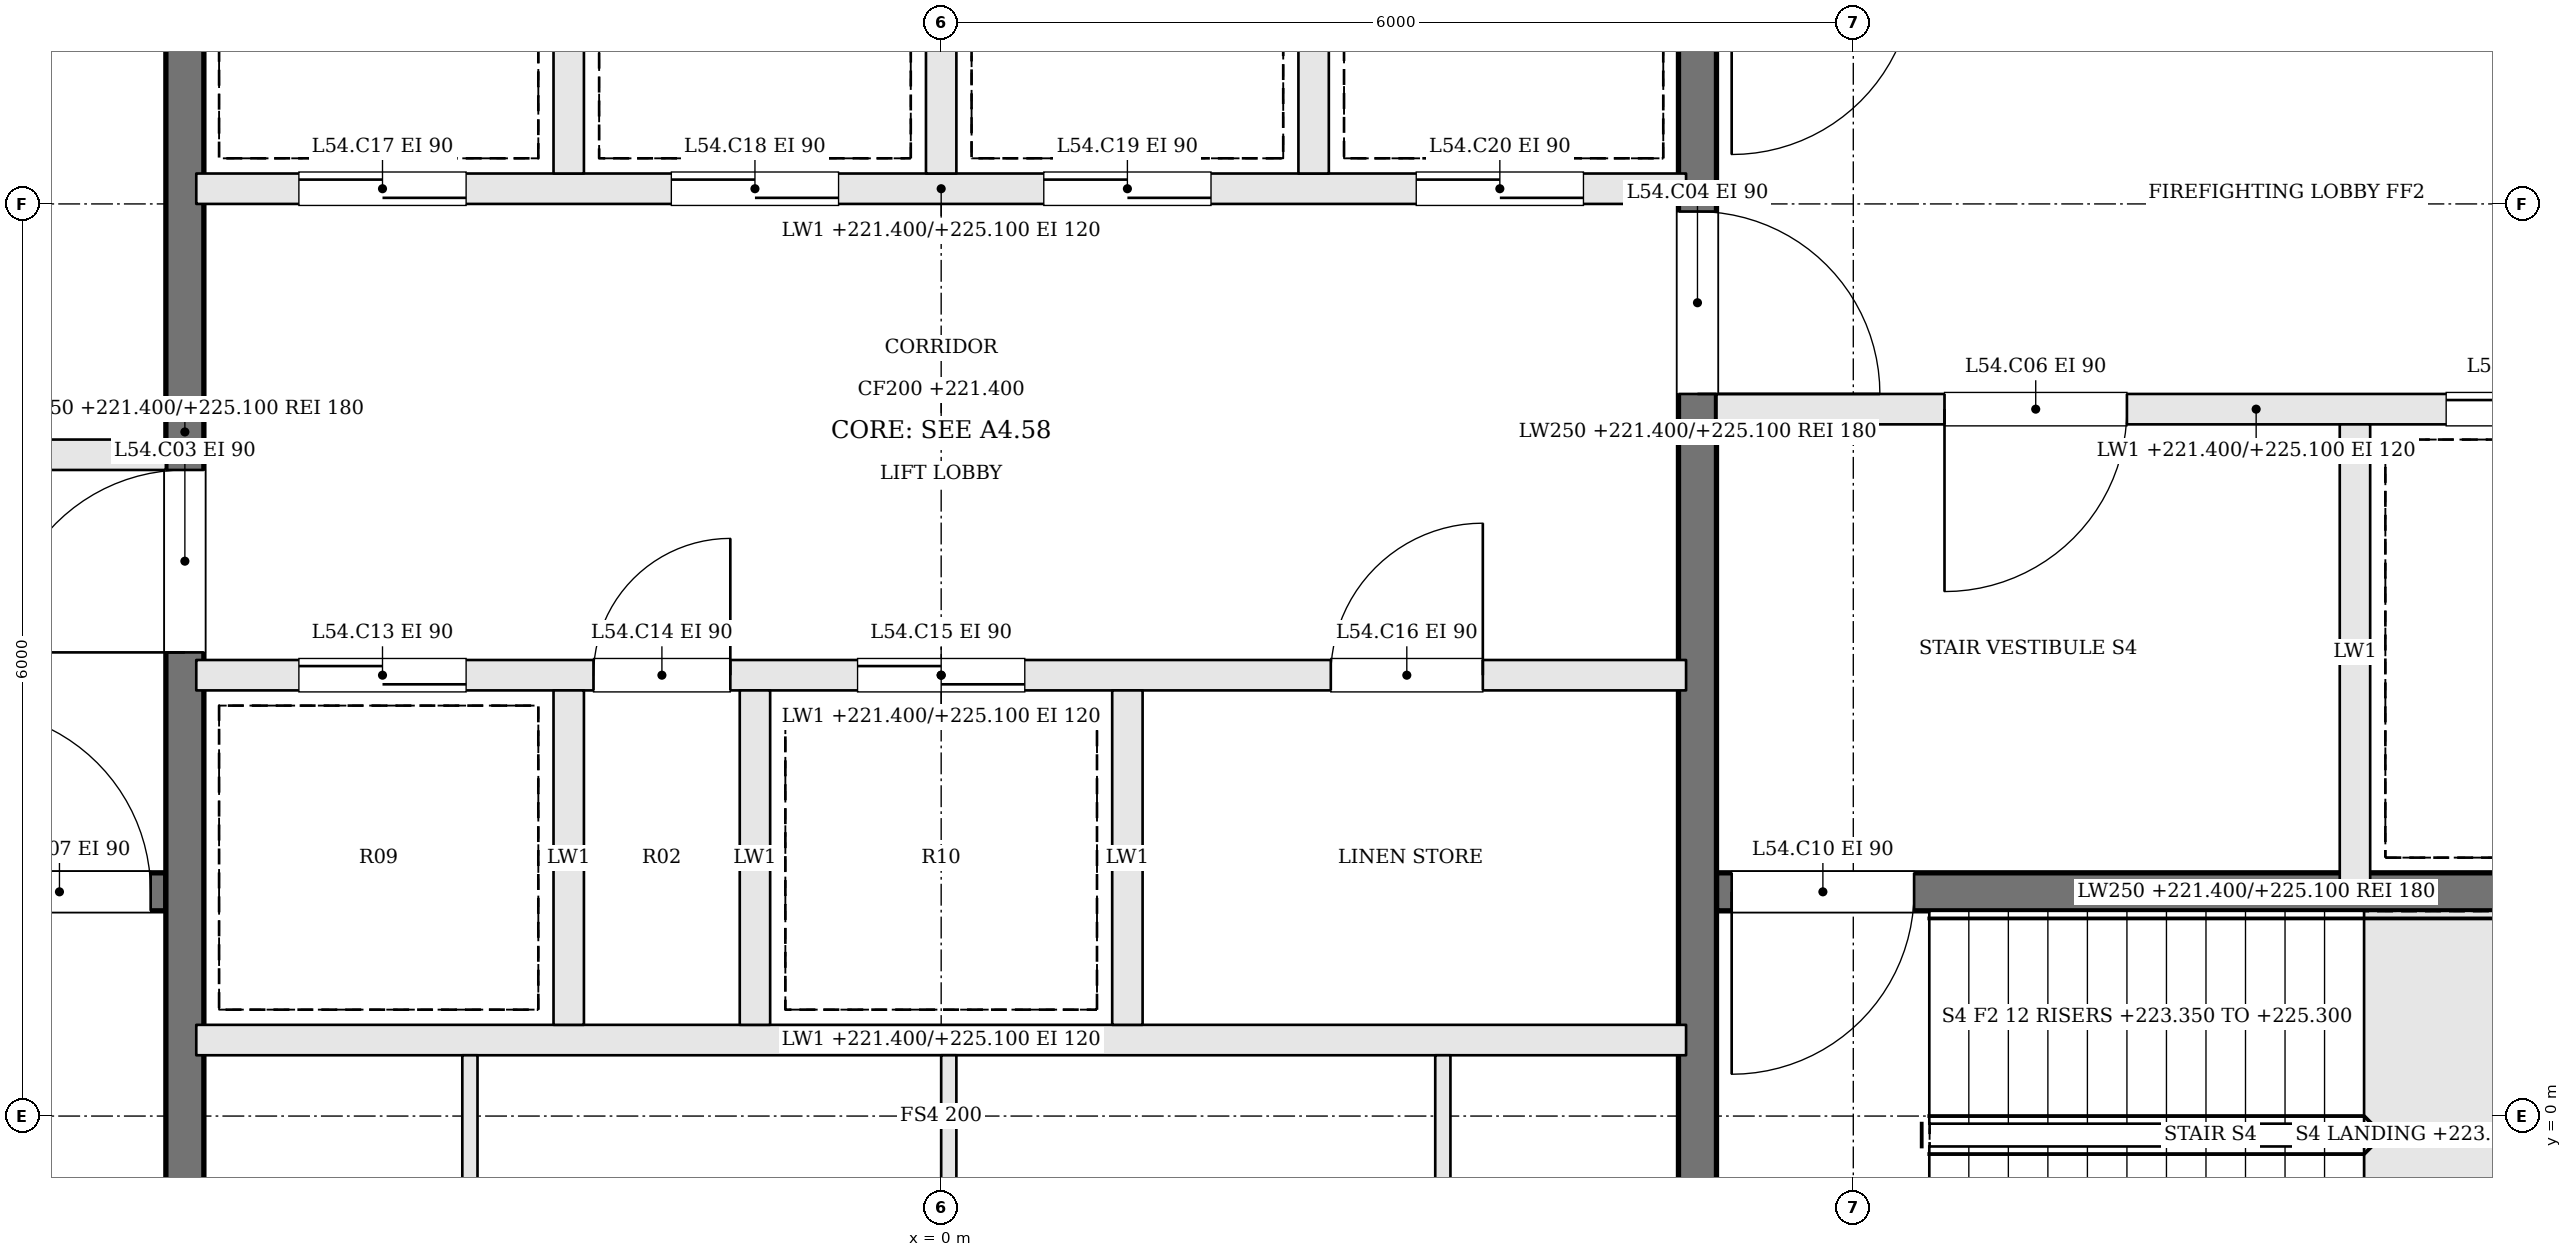
"""IFC4 building model, lengths in metres.
Left out: names, types, materials, properties, quantities, classifications, styles, units other than length and angle.
Written with IfcOpenShell. Run it as: python <this file> out.ifc"""

import sys

from ifc_helpers import new_model, si_unit, direction, frame, frame_2d, origin, place, context, subcontext, project, spatial, rectangle, extrude, element, fill, save


model = new_model("IFC4")
c1 = context("Model", 3, precision=1e-05, world=origin(), true_north=direction((0.0, 1.0)))
c2 = subcontext(c1, "Body", "Model", "MODEL_VIEW")
j1 = project(units=[si_unit("LENGTHUNIT", "METRE"), si_unit("PLANEANGLEUNIT", "RADIAN")], contexts=[c1])
p1 = place(None, origin())
s1 = spatial("IfcSite", under=j1, at=p1, CompositionType="ELEMENT")
p2 = place(p1, origin())
s2 = spatial("IfcBuilding", under=s1, at=p2, CompositionType="ELEMENT")
p3 = place(p2, frame((0.0, 0.0, 221.4)))
s3 = spatial("IfcBuildingStorey", under=s2, at=p3, CompositionType="ELEMENT", Elevation=221.4)
p4 = place(p3, frame((-12.2, 1.475, 0.0), z_axis=(0.0, 0.0, 1.0), x_axis=(1.0, 0.0, 0.0)))
e1 = element("IfcWall", 1, at=p4, inside=s3, PredefinedType="SOLIDWALL", context=c2, shape_type="SweptSolid", body=[
    extrude(rectangle(XDim=7.1, YDim=0.25, at=frame_2d((3.55, 0.0))), origin(), (0.0, 0.0, 1.0), 3.7),
])
p5 = place(p4, frame((5.8, 0.0, 0.0)))
e2 = element("IfcOpeningElement", 2, at=p5, cuts=e1, PredefinedType="OPENING", context=c2, shape_type="SweptSolid", body=[
    extrude(rectangle(XDim=1.2, YDim=2.1, at=frame_2d((0.6, 1.05))), frame((0.0, 0.135, 0.0), z_axis=(0.0, -1.0, 0.0), x_axis=(1.0, 0.0, 0.0)), (0.0, 0.0, 1.0), 0.27),
])
p6 = place(p3, frame((-12.2, 4.35, 0.0), z_axis=(0.0, 0.0, 1.0), x_axis=(1.0, 0.0, 0.0)))
e3 = element("IfcWall", 3, at=p6, inside=s3, PredefinedType="SOLIDWALL", context=c2, shape_type="SweptSolid", body=[
    extrude(rectangle(XDim=7.1, YDim=0.2, at=frame_2d((3.55, 0.0))), origin(), (0.0, 0.0, 1.0), 3.7),
])
p7 = place(p6, frame((4.4, 0.0, 0.0)))
e4 = element("IfcOpeningElement", 4, at=p7, cuts=e3, PredefinedType="OPENING", context=c2, shape_type="SweptSolid", body=[
    extrude(rectangle(XDim=1.2, YDim=2.1, at=frame_2d((0.6, 1.05))), frame((0.0, 0.11, 0.0), z_axis=(0.0, -1.0, 0.0), x_axis=(1.0, 0.0, 0.0)), (0.0, 0.0, 1.0), 0.22),
])
p8 = place(p6, frame((1.1, 0.0, 0.0)))
e5 = element("IfcOpeningElement", 5, at=p8, cuts=e3, PredefinedType="OPENING", context=c2, shape_type="SweptSolid", body=[
    extrude(rectangle(XDim=1.2, YDim=2.1, at=frame_2d((0.6, 1.05))), frame((0.0, 0.11, 0.0), z_axis=(0.0, -1.0, 0.0), x_axis=(1.0, 0.0, 0.0)), (0.0, 0.0, 1.0), 0.22),
])
p9 = place(p3, frame((12.2, 4.65, 0.0), z_axis=(0.0, 0.0, 1.0), x_axis=(-1.0, 0.0, 0.0)))
e6 = element("IfcWall", 6, at=p9, inside=s3, PredefinedType="SOLIDWALL", context=c2, shape_type="SweptSolid", body=[
    extrude(rectangle(XDim=7.1, YDim=0.2, at=frame_2d((3.55, 0.0))), origin(), (0.0, 0.0, 1.0), 3.7),
])
p10 = place(p9, frame((4.4, 0.0, 0.0)))
e7 = element("IfcOpeningElement", 7, at=p10, cuts=e6, PredefinedType="OPENING", context=c2, shape_type="SweptSolid", body=[
    extrude(rectangle(XDim=1.2, YDim=2.1, at=frame_2d((0.6, 1.05))), frame((0.0, 0.11, 0.0), z_axis=(0.0, -1.0, 0.0), x_axis=(1.0, 0.0, 0.0)), (0.0, 0.0, 1.0), 0.22),
])
p11 = place(p9, frame((1.1, 0.0, 0.0)))
e8 = element("IfcOpeningElement", 8, at=p11, cuts=e6, PredefinedType="OPENING", context=c2, shape_type="SweptSolid", body=[
    extrude(rectangle(XDim=1.2, YDim=2.1, at=frame_2d((0.6, 1.05))), frame((0.0, 0.11, 0.0), z_axis=(0.0, -1.0, 0.0), x_axis=(1.0, 0.0, 0.0)), (0.0, 0.0, 1.0), 0.22),
])
p12 = place(p3, frame((12.2, 1.475, 0.0), z_axis=(0.0, 0.0, 1.0), x_axis=(-1.0, 0.0, 0.0)))
e9 = element("IfcWall", 9, at=p12, inside=s3, PredefinedType="SOLIDWALL", context=c2, shape_type="SweptSolid", body=[
    extrude(rectangle(XDim=7.1, YDim=0.25, at=frame_2d((3.55, 0.0))), origin(), (0.0, 0.0, 1.0), 3.7),
])
p13 = place(p12, frame((5.8, 0.0, 0.0)))
e10 = element("IfcOpeningElement", 10, at=p13, cuts=e9, PredefinedType="OPENING", context=c2, shape_type="SweptSolid", body=[
    extrude(rectangle(XDim=1.2, YDim=2.1, at=frame_2d((0.6, 1.05))), frame((0.0, 0.135, 0.0), z_axis=(0.0, -1.0, 0.0), x_axis=(1.0, 0.0, 0.0)), (0.0, 0.0, 1.0), 0.27),
])
p14 = place(p3, frame((9.3, 4.55, 0.0), z_axis=(0.0, 0.0, 1.0), x_axis=(0.0, -1.0, 0.0)))
e11 = element("IfcWall", 11, at=p14, inside=s3, PredefinedType="SOLIDWALL", context=c2, shape_type="SweptSolid", body=[
    extrude(rectangle(XDim=3.0, YDim=0.2, at=frame_2d((1.5, 0.0))), origin(), (0.0, 0.0, 1.0), 3.7),
])
p15 = place(p3, frame((-4.975, -2.2, 0.0), z_axis=(0.0, 0.0, 1.0), x_axis=(0.0, 1.0, 0.0)))
e12 = element("IfcWall", 12, at=p15, inside=s3, PredefinedType="SOLIDWALL", context=c2, shape_type="SweptSolid", body=[
    extrude(rectangle(XDim=13.4, YDim=0.25, at=frame_2d((6.7, 0.0))), origin(), (0.0, 0.0, 1.0), 3.7),
])
p16 = place(p15, frame((5.25, 0.0, 0.0)))
e13 = element("IfcOpeningElement", 13, at=p16, cuts=e12, PredefinedType="OPENING", context=c2, shape_type="SweptSolid", body=[
    extrude(rectangle(XDim=1.2, YDim=2.1, at=frame_2d((0.6, 1.05))), frame((0.0, 0.135, 0.0), z_axis=(0.0, -1.0, 0.0), x_axis=(1.0, 0.0, 0.0)), (0.0, 0.0, 1.0), 0.27),
])
p17 = place(p3, frame((4.975, 11.2, 0.0), z_axis=(0.0, 0.0, 1.0), x_axis=(0.0, -1.0, 0.0)))
e14 = element("IfcWall", 14, at=p17, inside=s3, PredefinedType="SOLIDWALL", context=c2, shape_type="SweptSolid", body=[
    extrude(rectangle(XDim=13.4, YDim=0.25, at=frame_2d((6.7, 0.0))), origin(), (0.0, 0.0, 1.0), 3.7),
])
p18 = place(p17, frame((5.25, 0.0, 0.0)))
e15 = element("IfcOpeningElement", 15, at=p18, cuts=e14, PredefinedType="OPENING", context=c2, shape_type="SweptSolid", body=[
    extrude(rectangle(XDim=1.2, YDim=2.1, at=frame_2d((0.6, 1.05))), frame((0.0, 0.135, 0.0), z_axis=(0.0, -1.0, 0.0), x_axis=(1.0, 0.0, 0.0)), (0.0, 0.0, 1.0), 0.27),
])
p19 = place(p3, frame((-4.9, 0.5, 0.0), z_axis=(0.0, 0.0, 1.0), x_axis=(1.0, 0.0, 0.0)))
e16 = element("IfcWall", 16, at=p19, inside=s3, PredefinedType="SOLIDWALL", context=c2, shape_type="SweptSolid", body=[
    extrude(rectangle(XDim=9.8, YDim=0.2, at=frame_2d((4.9, 0.0))), origin(), (0.0, 0.0, 1.0), 3.7),
])
p20 = place(p3, frame((-4.9, 2.9, 0.0), z_axis=(0.0, 0.0, 1.0), x_axis=(1.0, 0.0, 0.0)))
e17 = element("IfcWall", 17, at=p20, inside=s3, PredefinedType="SOLIDWALL", context=c2, shape_type="SweptSolid", body=[
    extrude(rectangle(XDim=9.8, YDim=0.2, at=frame_2d((4.9, 0.0))), origin(), (0.0, 0.0, 1.0), 3.7),
])
p21 = place(p20, frame((0.675, 0.0, 0.0)))
e18 = element("IfcOpeningElement", 18, at=p21, cuts=e17, PredefinedType="OPENING", context=c2, shape_type="SweptSolid", body=[
    extrude(rectangle(XDim=1.1, YDim=2.1, at=frame_2d((0.55, 1.05))), frame((0.0, 0.11, 0.0), z_axis=(0.0, -1.0, 0.0), x_axis=(1.0, 0.0, 0.0)), (0.0, 0.0, 1.0), 0.22),
])
p22 = place(p20, frame((2.613, 0.0, 0.0)))
e19 = element("IfcOpeningElement", 19, at=p22, cuts=e17, PredefinedType="OPENING", context=c2, shape_type="SweptSolid", body=[
    extrude(rectangle(XDim=0.9, YDim=2.1, at=frame_2d((0.45, 1.05))), frame((0.0, 0.11, 0.0), z_axis=(0.0, -1.0, 0.0), x_axis=(1.0, 0.0, 0.0)), (0.0, 0.0, 1.0), 0.22),
])
p23 = place(p20, frame((4.35, 0.0, 0.0)))
e20 = element("IfcOpeningElement", 20, at=p23, cuts=e17, PredefinedType="OPENING", context=c2, shape_type="SweptSolid", body=[
    extrude(rectangle(XDim=1.1, YDim=2.1, at=frame_2d((0.55, 1.05))), frame((0.0, 0.11, 0.0), z_axis=(0.0, -1.0, 0.0), x_axis=(1.0, 0.0, 0.0)), (0.0, 0.0, 1.0), 0.22),
])
p24 = place(p20, frame((7.463, 0.0, 0.0)))
e21 = element("IfcOpeningElement", 21, at=p24, cuts=e17, PredefinedType="OPENING", context=c2, shape_type="SweptSolid", body=[
    extrude(rectangle(XDim=1.0, YDim=2.1, at=frame_2d((0.5, 1.05))), frame((0.0, 0.11, 0.0), z_axis=(0.0, -1.0, 0.0), x_axis=(1.0, 0.0, 0.0)), (0.0, 0.0, 1.0), 0.22),
])
p25 = place(p3, frame((-4.9, 6.1, 0.0), z_axis=(0.0, 0.0, 1.0), x_axis=(1.0, 0.0, 0.0)))
e22 = element("IfcWall", 22, at=p25, inside=s3, PredefinedType="SOLIDWALL", context=c2, shape_type="SweptSolid", body=[
    extrude(rectangle(XDim=9.8, YDim=0.2, at=frame_2d((4.9, 0.0))), origin(), (0.0, 0.0, 1.0), 3.7),
])
p26 = place(p25, frame((0.675, 0.0, 0.0)))
e23 = element("IfcOpeningElement", 23, at=p26, cuts=e22, PredefinedType="OPENING", context=c2, shape_type="SweptSolid", body=[
    extrude(rectangle(XDim=1.1, YDim=2.1, at=frame_2d((0.55, 1.05))), frame((0.0, 0.11, 0.0), z_axis=(0.0, -1.0, 0.0), x_axis=(1.0, 0.0, 0.0)), (0.0, 0.0, 1.0), 0.22),
])
p27 = place(p25, frame((3.125, 0.0, 0.0)))
e24 = element("IfcOpeningElement", 24, at=p27, cuts=e22, PredefinedType="OPENING", context=c2, shape_type="SweptSolid", body=[
    extrude(rectangle(XDim=1.1, YDim=2.1, at=frame_2d((0.55, 1.05))), frame((0.0, 0.11, 0.0), z_axis=(0.0, -1.0, 0.0), x_axis=(1.0, 0.0, 0.0)), (0.0, 0.0, 1.0), 0.22),
])
p28 = place(p25, frame((5.575, 0.0, 0.0)))
e25 = element("IfcOpeningElement", 25, at=p28, cuts=e22, PredefinedType="OPENING", context=c2, shape_type="SweptSolid", body=[
    extrude(rectangle(XDim=1.1, YDim=2.1, at=frame_2d((0.55, 1.05))), frame((0.0, 0.11, 0.0), z_axis=(0.0, -1.0, 0.0), x_axis=(1.0, 0.0, 0.0)), (0.0, 0.0, 1.0), 0.22),
])
p29 = place(p25, frame((8.025, 0.0, 0.0)))
e26 = element("IfcOpeningElement", 26, at=p29, cuts=e22, PredefinedType="OPENING", context=c2, shape_type="SweptSolid", body=[
    extrude(rectangle(XDim=1.1, YDim=2.1, at=frame_2d((0.55, 1.05))), frame((0.0, 0.11, 0.0), z_axis=(0.0, -1.0, 0.0), x_axis=(1.0, 0.0, 0.0)), (0.0, 0.0, 1.0), 0.22),
])
for number, where, z_axis, x_axis in (
    (27, (-2.45, 0.6, 0.0), (0.0, 0.0, 1.0), (0.0, 1.0, 0.0)),
    (28, (-1.225, 0.6, 0.0), (0.0, 0.0, 1.0), (0.0, 1.0, 0.0)),
    (29, (1.225, 0.6, 0.0), (0.0, 0.0, 1.0), (0.0, 1.0, 0.0)),
    (30, (-2.45, 6.2, 0.0), (0.0, 0.0, 1.0), (0.0, 1.0, 0.0)),
    (31, (0.0, 6.2, 0.0), (0.0, 0.0, 1.0), (0.0, 1.0, 0.0)),
    (32, (2.45, 6.2, 0.0), (0.0, 0.0, 1.0), (0.0, 1.0, 0.0)),
):
    element("IfcWall", number, at=place(p3, frame(where, z_axis=z_axis, x_axis=x_axis)), inside=s3, PredefinedType="SOLIDWALL", context=c2, shape_type="SweptSolid", body=[
        extrude(rectangle(XDim=2.2, YDim=0.2, at=frame_2d((1.1, 0.0))), origin(), (0.0, 0.0, 1.0), 3.7),
    ])
for number, where, z_axis, x_axis in (
    (33, (-3.1, -2.2, 0.0), (0.0, 0.0, 1.0), (0.0, 1.0, 0.0)),
    (34, (0.05, -2.2, 0.0), (0.0, 0.0, 1.0), (0.0, 1.0, 0.0)),
    (35, (3.3, -2.2, 0.0), (0.0, 0.0, 1.0), (0.0, 1.0, 0.0)),
):
    element("IfcWall", number, at=place(p3, frame(where, z_axis=z_axis, x_axis=x_axis)), inside=s3, PredefinedType="PARTITIONING", context=c2, shape_type="SweptSolid", body=[
        extrude(rectangle(XDim=2.6, YDim=0.1, at=frame_2d((1.3, 0.0))), origin(), (0.0, 0.0, 1.0), 3.7),
    ])
p30 = place(p16, origin())
e36 = element("IfcDoor", 36, at=p30, inside=s3, OperationType="SINGLE_SWING_LEFT", PredefinedType="DOOR", context=c2, shape_type="SweptSolid", body=[
    extrude(rectangle(XDim=1.2, YDim=2.1, at=frame_2d((0.6, 1.05))), frame((0.0, 0.025, 0.0), z_axis=(0.0, -1.0, 0.0), x_axis=(1.0, 0.0, 0.0)), (0.0, 0.0, 1.0), 0.05),
])
fill(e13, e36)
p31 = place(p18, origin())
e37 = element("IfcDoor", 37, at=p31, inside=s3, OperationType="SINGLE_SWING_RIGHT", PredefinedType="DOOR", context=c2, shape_type="SweptSolid", body=[
    extrude(rectangle(XDim=1.2, YDim=2.1, at=frame_2d((0.6, 1.05))), frame((0.0, 0.025, 0.0), z_axis=(0.0, -1.0, 0.0), x_axis=(1.0, 0.0, 0.0)), (0.0, 0.0, 1.0), 0.05),
])
fill(e15, e37)
p32 = place(p10, origin())
e38 = element("IfcDoor", 38, at=p32, inside=s3, OperationType="SINGLE_SWING_RIGHT", PredefinedType="DOOR", context=c2, shape_type="SweptSolid", body=[
    extrude(rectangle(XDim=1.2, YDim=2.1, at=frame_2d((0.6, 1.05))), frame((0.0, 0.025, 0.0), z_axis=(0.0, -1.0, 0.0), x_axis=(1.0, 0.0, 0.0)), (0.0, 0.0, 1.0), 0.05),
])
fill(e7, e38)
p33 = place(p5, origin())
e39 = element("IfcDoor", 39, at=p33, inside=s3, OperationType="SINGLE_SWING_LEFT", PredefinedType="DOOR", context=c2, shape_type="SweptSolid", body=[
    extrude(rectangle(XDim=1.2, YDim=2.1, at=frame_2d((0.6, 1.05))), frame((0.0, 0.025, 0.0), z_axis=(0.0, -1.0, 0.0), x_axis=(1.0, 0.0, 0.0)), (0.0, 0.0, 1.0), 0.05),
])
fill(e2, e39)
p34 = place(p13, origin())
e40 = element("IfcDoor", 40, at=p34, inside=s3, OperationType="SINGLE_SWING_RIGHT", PredefinedType="DOOR", context=c2, shape_type="SweptSolid", body=[
    extrude(rectangle(XDim=1.2, YDim=2.1, at=frame_2d((0.6, 1.05))), frame((0.0, 0.025, 0.0), z_axis=(0.0, -1.0, 0.0), x_axis=(1.0, 0.0, 0.0)), (0.0, 0.0, 1.0), 0.05),
])
fill(e10, e40)
p35 = place(p11, origin())
e41 = element("IfcDoor", 41, at=p35, inside=s3, OperationType="SLIDING_TO_RIGHT", PredefinedType="DOOR", context=c2, shape_type="SweptSolid", body=[
    extrude(rectangle(XDim=1.2, YDim=2.1, at=frame_2d((0.6, 1.05))), frame((0.0, 0.025, 0.0), z_axis=(0.0, -1.0, 0.0), x_axis=(1.0, 0.0, 0.0)), (0.0, 0.0, 1.0), 0.05),
])
fill(e8, e41)
p36 = place(p21, origin())
e42 = element("IfcDoor", 42, at=p36, inside=s3, OperationType="SLIDING_TO_RIGHT", PredefinedType="DOOR", context=c2, shape_type="SweptSolid", body=[
    extrude(rectangle(XDim=1.1, YDim=2.1, at=frame_2d((0.55, 1.05))), frame((0.0, 0.025, 0.0), z_axis=(0.0, -1.0, 0.0), x_axis=(1.0, 0.0, 0.0)), (0.0, 0.0, 1.0), 0.05),
])
fill(e18, e42)
p37 = place(p22, origin())
e43 = element("IfcDoor", 43, at=p37, inside=s3, OperationType="SINGLE_SWING_RIGHT", PredefinedType="DOOR", context=c2, shape_type="SweptSolid", body=[
    extrude(rectangle(XDim=0.9, YDim=2.1, at=frame_2d((0.45, 1.05))), frame((0.0, 0.025, 0.0), z_axis=(0.0, -1.0, 0.0), x_axis=(1.0, 0.0, 0.0)), (0.0, 0.0, 1.0), 0.05),
])
fill(e19, e43)
p38 = place(p23, origin())
e44 = element("IfcDoor", 44, at=p38, inside=s3, OperationType="SLIDING_TO_LEFT", PredefinedType="DOOR", context=c2, shape_type="SweptSolid", body=[
    extrude(rectangle(XDim=1.1, YDim=2.1, at=frame_2d((0.55, 1.05))), frame((0.0, 0.025, 0.0), z_axis=(0.0, -1.0, 0.0), x_axis=(1.0, 0.0, 0.0)), (0.0, 0.0, 1.0), 0.05),
])
fill(e20, e44)
p39 = place(p24, origin())
e45 = element("IfcDoor", 45, at=p39, inside=s3, OperationType="SINGLE_SWING_RIGHT", PredefinedType="DOOR", context=c2, shape_type="SweptSolid", body=[
    extrude(rectangle(XDim=1.0, YDim=2.1, at=frame_2d((0.5, 1.05))), frame((0.0, 0.025, 0.0), z_axis=(0.0, -1.0, 0.0), x_axis=(1.0, 0.0, 0.0)), (0.0, 0.0, 1.0), 0.05),
])
fill(e21, e45)
p40 = place(p26, origin())
e46 = element("IfcDoor", 46, at=p40, inside=s3, OperationType="SLIDING_TO_RIGHT", PredefinedType="DOOR", context=c2, shape_type="SweptSolid", body=[
    extrude(rectangle(XDim=1.1, YDim=2.1, at=frame_2d((0.55, 1.05))), frame((0.0, 0.025, 0.0), z_axis=(0.0, -1.0, 0.0), x_axis=(1.0, 0.0, 0.0)), (0.0, 0.0, 1.0), 0.05),
])
fill(e23, e46)
p41 = place(p27, origin())
e47 = element("IfcDoor", 47, at=p41, inside=s3, OperationType="SLIDING_TO_LEFT", PredefinedType="DOOR", context=c2, shape_type="SweptSolid", body=[
    extrude(rectangle(XDim=1.1, YDim=2.1, at=frame_2d((0.55, 1.05))), frame((0.0, 0.025, 0.0), z_axis=(0.0, -1.0, 0.0), x_axis=(1.0, 0.0, 0.0)), (0.0, 0.0, 1.0), 0.05),
])
fill(e24, e47)
p42 = place(p28, origin())
e48 = element("IfcDoor", 48, at=p42, inside=s3, OperationType="SLIDING_TO_RIGHT", PredefinedType="DOOR", context=c2, shape_type="SweptSolid", body=[
    extrude(rectangle(XDim=1.1, YDim=2.1, at=frame_2d((0.55, 1.05))), frame((0.0, 0.025, 0.0), z_axis=(0.0, -1.0, 0.0), x_axis=(1.0, 0.0, 0.0)), (0.0, 0.0, 1.0), 0.05),
])
fill(e25, e48)
p43 = place(p29, origin())
e49 = element("IfcDoor", 49, at=p43, inside=s3, OperationType="SLIDING_TO_LEFT", PredefinedType="DOOR", context=c2, shape_type="SweptSolid", body=[
    extrude(rectangle(XDim=1.1, YDim=2.1, at=frame_2d((0.55, 1.05))), frame((0.0, 0.025, 0.0), z_axis=(0.0, -1.0, 0.0), x_axis=(1.0, 0.0, 0.0)), (0.0, 0.0, 1.0), 0.05),
])
fill(e26, e49)
save(model, sys.argv[1])
